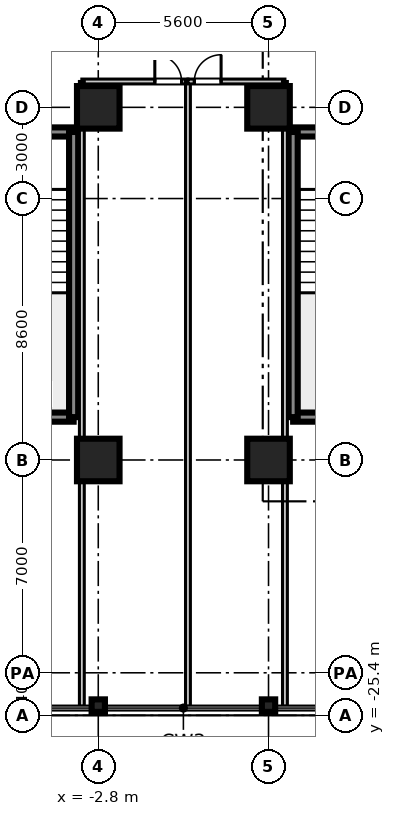
"""IFC4 building model, lengths in metres.
Left out: names, types, materials, properties, quantities, classifications, styles, units other than length and angle.
Written with IfcOpenShell. Run it as: python <this file> out.ifc"""

import sys

from ifc_helpers import new_model, si_unit, direction, frame, frame_2d, origin, origin_2d, place, context, subcontext, project, spatial, rectangle, i_section, extrude, source, transform, mapped, element, fill, save


model = new_model("IFC4")
c1 = context("Model", 3, precision=1e-05, world=origin(), true_north=direction((0.0, 1.0)))
c2 = subcontext(c1, "Body", "Model", "MODEL_VIEW")
j1 = project(units=[si_unit("LENGTHUNIT", "METRE"), si_unit("PLANEANGLEUNIT", "RADIAN")], contexts=[c1])
p1 = place(None, origin())
s1 = spatial("IfcSite", under=j1, at=p1, CompositionType="ELEMENT")
p2 = place(p1, origin())
s2 = spatial("IfcBuilding", under=s1, at=p2, CompositionType="ELEMENT")
p3 = place(p2, frame((0.0, 0.0, 61.6)))
s3 = spatial("IfcBuildingStorey", under=s2, at=p3, CompositionType="ELEMENT", Elevation=61.6)
m1 = source(origin(), c2, "Body", "SweptSolid", [
    extrude(rectangle(XDim=1.4, YDim=1.4, at=origin_2d()), origin(), (0.0, 0.0, 1.0), 3.605),
])
for number, where, z_axis, x_axis in (
    (1, (-2.8, -17.0, 0.0), (0.0, 0.0, 1.0), (1.0, 0.0, 0.0)),
    (2, (-2.8, -5.4, 0.0), (0.0, 0.0, 1.0), (1.0, 0.0, 0.0)),
    (3, (2.8, -17.0, 0.0), (0.0, 0.0, 1.0), (1.0, 0.0, 0.0)),
    (4, (2.8, -5.4, 0.0), (0.0, 0.0, 1.0), (1.0, 0.0, 0.0)),
):
    element("IfcColumn", number, at=place(p3, frame(where, z_axis=z_axis, x_axis=x_axis)), inside=s3, PredefinedType="COLUMN", context=c2, shape_type="MappedRepresentation", body=[
        mapped(m1, transform((0.0, 0.0, 0.0), scale=1.0)),
    ])
m2 = source(origin(), c2, "Body", "SweptSolid", [
    extrude(i_section(OverallWidth=0.412, OverallDepth=0.438, WebThickness=0.023, FlangeThickness=0.036, at=origin_2d()), origin(), (0.0, 0.0, 1.0), 3.605),
])
for number, where, z_axis, x_axis in (
    (5, (-2.8, -25.08, 0.0), (0.0, 0.0, 1.0), (0.0, 1.0, 0.0)),
    (6, (2.8, -25.08, 0.0), (0.0, 0.0, 1.0), (0.0, 1.0, 0.0)),
):
    element("IfcColumn", number, at=place(p3, frame(where, z_axis=z_axis, x_axis=x_axis)), inside=s3, PredefinedType="COLUMN", context=c2, shape_type="MappedRepresentation", body=[
        mapped(m2, transform((0.0, 0.0, 0.0), scale=1.0)),
    ])
m3 = source(origin(), c2, "Body", "SweptSolid", [
    extrude(rectangle(XDim=3.98, YDim=0.3, at=frame_2d((1.99, 0.0))), origin(), (0.0, 0.0, 1.0), 3.37),
])
for number, where, z_axis, x_axis in (
    (7, (3.61, -15.59, 0.0), (0.0, 0.0, 1.0), (1.0, 0.0, 0.0)),
    (8, (3.61, -6.21, 0.0), (0.0, 0.0, 1.0), (1.0, 0.0, 0.0)),
):
    element("IfcWall", number, at=place(p3, frame(where, z_axis=z_axis, x_axis=x_axis)), inside=s3, PredefinedType="SHEAR", context=c2, shape_type="MappedRepresentation", body=[
        mapped(m3, transform((0.0, 0.0, 0.0), scale=1.0)),
    ])
m4 = source(origin(), c2, "Body", "SweptSolid", [
    extrude(rectangle(XDim=9.38, YDim=0.3, at=frame_2d((4.69, 0.0))), origin(), (0.0, 0.0, 1.0), 3.37),
])
p4 = place(p3, frame((3.61, -15.59, 0.0), z_axis=(0.0, 0.0, 1.0), x_axis=(0.0, 1.0, 0.0)))
e9 = element("IfcWall", 9, at=p4, inside=s3, PredefinedType="SHEAR", context=c2, shape_type="MappedRepresentation", body=[
    mapped(m4, transform((0.0, 0.0, 0.0), scale=1.0)),
])
p5 = place(p3, frame((-7.59, -15.59, 0.0), z_axis=(0.0, 0.0, 1.0), x_axis=(1.0, 0.0, 0.0)))
e10 = element("IfcWall", 10, at=p5, inside=s3, PredefinedType="SHEAR", context=c2, shape_type="MappedRepresentation", body=[
    mapped(m3, transform((0.0, 0.0, 0.0), scale=1.0)),
])
p6 = place(p3, frame((-7.59, -6.21, 0.0), z_axis=(0.0, 0.0, 1.0), x_axis=(1.0, 0.0, 0.0)))
e11 = element("IfcWall", 11, at=p6, inside=s3, PredefinedType="SHEAR", context=c2, shape_type="MappedRepresentation", body=[
    mapped(m3, transform((0.0, 0.0, 0.0), scale=1.0)),
])
p7 = place(p6, frame((1.44, 0.0, 0.0)))
e12 = element("IfcOpeningElement", 12, at=p7, cuts=e11, PredefinedType="OPENING", context=c2, shape_type="SweptSolid", body=[
    extrude(rectangle(XDim=1.1, YDim=2.15, at=frame_2d((0.55, 1.075))), frame((0.0, 0.16, 0.0), z_axis=(0.0, -1.0, 0.0), x_axis=(1.0, 0.0, 0.0)), (0.0, 0.0, 1.0), 0.32),
])
p8 = place(p3, frame((-3.61, -15.59, 0.0), z_axis=(0.0, 0.0, 1.0), x_axis=(0.0, 1.0, 0.0)))
e13 = element("IfcWall", 13, at=p8, inside=s3, PredefinedType="SHEAR", context=c2, shape_type="MappedRepresentation", body=[
    mapped(m4, transform((0.0, 0.0, 0.0), scale=1.0)),
])
m5 = source(origin(), c2, "Body", "SweptSolid", [
    extrude(rectangle(XDim=3.49, YDim=0.16, at=frame_2d((1.745, 0.0))), origin(), (0.0, 0.0, 1.0), 2.71),
])
p9 = place(p3, frame((-3.34, -4.55, 0.0), z_axis=(0.0, 0.0, 1.0), x_axis=(1.0, 0.0, 0.0)))
e14 = element("IfcWall", 14, at=p9, inside=s3, PredefinedType="PARTITIONING", context=c2, shape_type="MappedRepresentation", body=[
    mapped(m5, transform((0.0, 0.0, 0.0), scale=1.0)),
])
p10 = place(p9, frame((2.4, 0.0, 0.0)))
e15 = element("IfcOpeningElement", 15, at=p10, cuts=e14, PredefinedType="OPENING", context=c2, shape_type="SweptSolid", body=[
    extrude(rectangle(XDim=0.88, YDim=2.1, at=frame_2d((0.44, 1.05))), frame((0.0, 0.09, 0.0), z_axis=(0.0, -1.0, 0.0), x_axis=(1.0, 0.0, 0.0)), (0.0, 0.0, 1.0), 0.18),
])
m6 = source(origin(), c2, "Body", "SweptSolid", [
    extrude(rectangle(XDim=20.55, YDim=0.16, at=frame_2d((10.275, 0.0))), origin(), (0.0, 0.0, 1.0), 2.71),
])
for number, where, z_axis, x_axis in (
    (16, (-3.34, -25.1, 0.0), (0.0, 0.0, 1.0), (0.0, 1.0, 0.0)),
    (17, (0.15, -25.1, 0.0), (0.0, 0.0, 1.0), (0.0, 1.0, 0.0)),
):
    element("IfcWall", number, at=place(p3, frame(where, z_axis=z_axis, x_axis=x_axis)), inside=s3, PredefinedType="PARTITIONING", context=c2, shape_type="MappedRepresentation", body=[
        mapped(m6, transform((0.0, 0.0, 0.0), scale=1.0)),
    ])
m7 = source(origin(), c2, "Body", "SweptSolid", [
    extrude(rectangle(XDim=3.19, YDim=0.16, at=frame_2d((1.595, 0.0))), origin(), (0.0, 0.0, 1.0), 2.71),
])
p11 = place(p3, frame((0.15, -4.55, 0.0), z_axis=(0.0, 0.0, 1.0), x_axis=(1.0, 0.0, 0.0)))
e18 = element("IfcWall", 18, at=p11, inside=s3, PredefinedType="PARTITIONING", context=c2, shape_type="MappedRepresentation", body=[
    mapped(m7, transform((0.0, 0.0, 0.0), scale=1.0)),
])
p12 = place(p11, frame((0.21, 0.0, 0.0)))
e19 = element("IfcOpeningElement", 19, at=p12, cuts=e18, PredefinedType="OPENING", context=c2, shape_type="SweptSolid", body=[
    extrude(rectangle(XDim=0.88, YDim=2.1, at=frame_2d((0.44, 1.05))), frame((0.0, 0.09, 0.0), z_axis=(0.0, -1.0, 0.0), x_axis=(1.0, 0.0, 0.0)), (0.0, 0.0, 1.0), 0.18),
])
p13 = place(p3, frame((3.34, -25.1, 0.0), z_axis=(0.0, 0.0, 1.0), x_axis=(0.0, 1.0, 0.0)))
e20 = element("IfcWall", 20, at=p13, inside=s3, PredefinedType="PARTITIONING", context=c2, shape_type="MappedRepresentation", body=[
    mapped(m6, transform((0.0, 0.0, 0.0), scale=1.0)),
])
m8 = source(origin(), c2, "Body", "SweptSolid", [
    extrude(rectangle(XDim=0.88, YDim=2.1, at=frame_2d((0.44, 1.05))), frame((0.0, 0.025, 0.0), z_axis=(0.0, -1.0, 0.0), x_axis=(1.0, 0.0, 0.0)), (0.0, 0.0, 1.0), 0.05),
])
p14 = place(p10, frame((0.88, 0.0, 0.0), z_axis=(0.0, 0.0, 1.0), x_axis=(-1.0, 0.0, 0.0)))
e21 = element("IfcDoor", 21, at=p14, inside=s3, OperationType="SINGLE_SWING_LEFT", PredefinedType="DOOR", context=c2, shape_type="MappedRepresentation", body=[
    mapped(m8, transform((0.0, 0.0, 0.0), scale=1.0)),
])
fill(e15, e21)
p15 = place(p12, frame((0.88, 0.0, 0.0), z_axis=(0.0, 0.0, 1.0), x_axis=(-1.0, 0.0, 0.0)))
e22 = element("IfcDoor", 22, at=p15, inside=s3, OperationType="SINGLE_SWING_RIGHT", PredefinedType="DOOR", context=c2, shape_type="MappedRepresentation", body=[
    mapped(m8, transform((0.0, 0.0, 0.0), scale=1.0)),
])
fill(e19, e22)
save(model, sys.argv[1])
